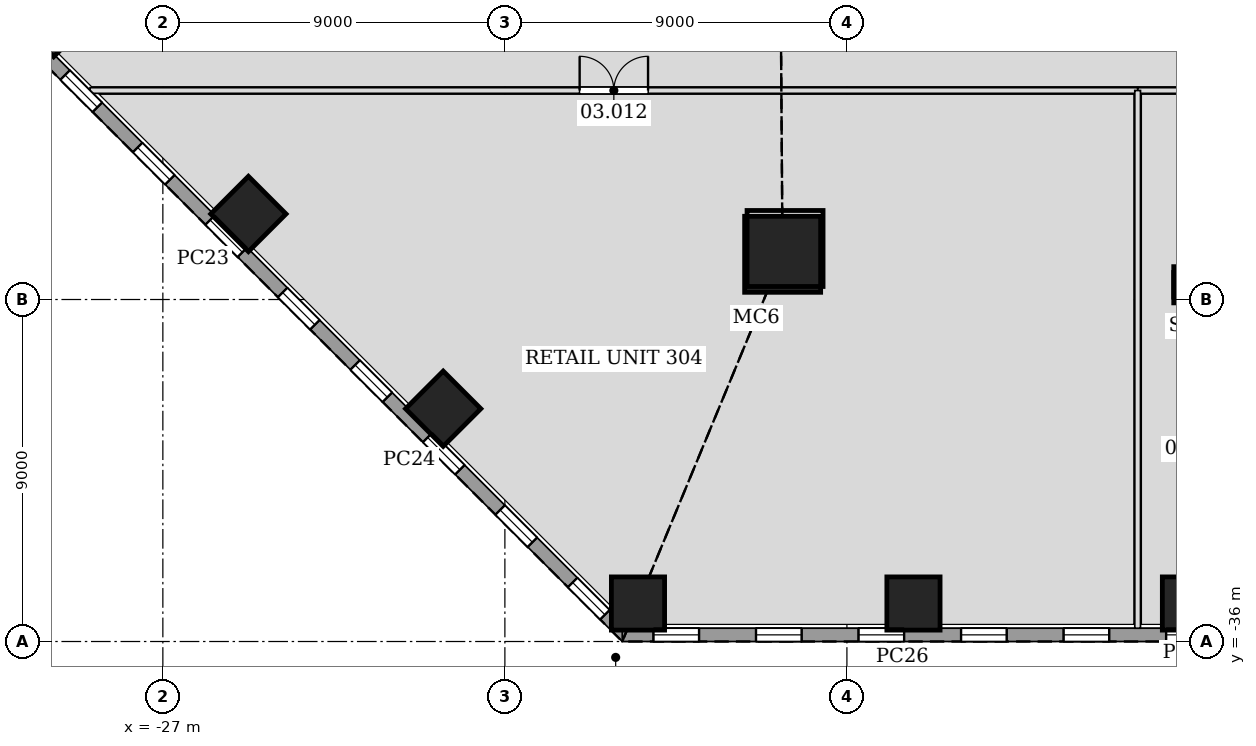
"""IFC4 building model, lengths in metres.
Left out: names, types, materials, properties, quantities, classifications, styles, units other than length and angle.
Written with IfcOpenShell. Run it as: python <this file> out.ifc"""

import sys

from ifc_helpers import new_model, si_unit, direction, frame, frame_2d, origin, origin_2d, place, context, subcontext, project, spatial, rectangle, hollow_rectangle, extrude, element, fill, save


model = new_model("IFC4")
c1 = context("Model", 3, precision=1e-05, world=origin(), true_north=direction((0.0, 1.0)))
c2 = subcontext(c1, "Body", "Model", "MODEL_VIEW")
j1 = project(units=[si_unit("LENGTHUNIT", "METRE"), si_unit("PLANEANGLEUNIT", "RADIAN")], contexts=[c1])
p1 = place(None, origin())
s1 = spatial("IfcSite", under=j1, at=p1, CompositionType="ELEMENT")
p2 = place(p1, origin())
s2 = spatial("IfcBuilding", under=s1, at=p2, CompositionType="ELEMENT")
p3 = place(p2, frame((0.0, 0.0, 18.6)))
s3 = spatial("IfcBuildingStorey", under=s2, at=p3, CompositionType="ELEMENT", Elevation=18.6)
p4 = place(p3, frame((-10.691, -25.81, 0.0), z_axis=(0.011704430453, 0.028289472832, 0.999531246152), x_axis=(-0.92403481427, 0.3823083337, 0.0)))
e1 = element("IfcColumn", 1, at=p4, inside=s3, PredefinedType="COLUMN", context=c2, shape_type="SweptSolid", body=[
    extrude(hollow_rectangle(XDim=2.0, YDim=2.0, WallThickness=0.09, at=origin_2d()), origin(), (0.0, 0.0, 1.0), 5.402),
])
p5 = place(p3, frame((0.0, -26.688, 0.0), z_axis=(0.0, 0.02824625291, 0.999600994996), x_axis=(-1.0, 0.0, 0.0)))
e2 = element("IfcColumn", 2, at=p5, inside=s3, PredefinedType="COLUMN", context=c2, shape_type="SweptSolid", body=[
    extrude(hollow_rectangle(XDim=0.8, YDim=0.8, WallThickness=0.05, at=origin_2d()), origin(), (0.0, 0.0, 1.0), 5.402),
])
for number, where, z_axis, x_axis in (
    (3, (-29.874, -19.623, 0.0), (0.0, 0.0, 1.0), (0.707, 0.707, 0.0)),
    (4, (-24.749, -24.749, 0.0), (0.0, 0.0, 1.0), (0.707, 0.707, 0.0)),
    (5, (-19.623, -29.874, 0.0), (0.0, 0.0, 1.0), (0.707, 0.707, 0.0)),
    (6, (-14.498, -35.0, 0.0), (0.0, 0.0, 1.0), (1.0, 0.0, 0.0)),
    (7, (-7.249, -35.0, 0.0), (0.0, 0.0, 1.0), (1.0, 0.0, 0.0)),
    (8, (0.0, -35.0, 0.0), (0.0, 0.0, 1.0), (1.0, 0.0, 0.0)),
):
    element("IfcColumn", number, at=place(p3, frame(where, z_axis=z_axis, x_axis=x_axis)), inside=s3, PredefinedType="COLUMN", context=c2, shape_type="SweptSolid", body=[
        extrude(rectangle(XDim=1.4, YDim=1.4, at=origin_2d()), origin(), (0.0, 0.0, 1.0), 5.4),
    ])
p6 = place(p3, frame((-35.876, -14.788, 0.0), z_axis=(0.0, 0.0, 1.0), x_axis=(0.707106781187, -0.707106781187, 0.0)))
e9 = element("IfcWall", 9, at=p6, inside=s3, PredefinedType="SOLIDWALL", context=c2, shape_type="SweptSolid", body=[
    extrude(rectangle(XDim=29.823, YDim=0.35, at=frame_2d((14.912, 0.0))), origin(), (0.0, 0.0, 1.0), 5.1),
])
p7 = place(p6, frame((0.822, 0.0, 0.9)))
e10 = element("IfcOpeningElement", 10, at=p7, cuts=e9, PredefinedType="OPENING", context=c2, shape_type="SweptSolid", body=[
    extrude(rectangle(XDim=1.2, YDim=3.6, at=frame_2d((0.6, 1.8))), frame((0.0, 0.185, 0.0), z_axis=(0.0, -1.0, 0.0), x_axis=(1.0, 0.0, 0.0)), (0.0, 0.0, 1.0), 0.37),
])
p8 = place(p6, frame((3.52, 0.0, 0.9)))
e11 = element("IfcOpeningElement", 11, at=p8, cuts=e9, PredefinedType="OPENING", context=c2, shape_type="SweptSolid", body=[
    extrude(rectangle(XDim=1.2, YDim=3.6, at=frame_2d((0.6, 1.8))), frame((0.0, 0.185, 0.0), z_axis=(0.0, -1.0, 0.0), x_axis=(1.0, 0.0, 0.0)), (0.0, 0.0, 1.0), 0.37),
])
p9 = place(p6, frame((6.218, 0.0, 0.9)))
e12 = element("IfcOpeningElement", 12, at=p9, cuts=e9, PredefinedType="OPENING", context=c2, shape_type="SweptSolid", body=[
    extrude(rectangle(XDim=1.2, YDim=3.6, at=frame_2d((0.6, 1.8))), frame((0.0, 0.185, 0.0), z_axis=(0.0, -1.0, 0.0), x_axis=(1.0, 0.0, 0.0)), (0.0, 0.0, 1.0), 0.37),
])
p10 = place(p6, frame((8.916, 0.0, 0.9)))
e13 = element("IfcOpeningElement", 13, at=p10, cuts=e9, PredefinedType="OPENING", context=c2, shape_type="SweptSolid", body=[
    extrude(rectangle(XDim=1.2, YDim=3.6, at=frame_2d((0.6, 1.8))), frame((0.0, 0.185, 0.0), z_axis=(0.0, -1.0, 0.0), x_axis=(1.0, 0.0, 0.0)), (0.0, 0.0, 1.0), 0.37),
])
p11 = place(p6, frame((11.614, 0.0, 0.9)))
e14 = element("IfcOpeningElement", 14, at=p11, cuts=e9, PredefinedType="OPENING", context=c2, shape_type="SweptSolid", body=[
    extrude(rectangle(XDim=1.2, YDim=3.6, at=frame_2d((0.6, 1.8))), frame((0.0, 0.185, 0.0), z_axis=(0.0, -1.0, 0.0), x_axis=(1.0, 0.0, 0.0)), (0.0, 0.0, 1.0), 0.37),
])
p12 = place(p6, frame((14.312, 0.0, 0.9)))
e15 = element("IfcOpeningElement", 15, at=p12, cuts=e9, PredefinedType="OPENING", context=c2, shape_type="SweptSolid", body=[
    extrude(rectangle(XDim=1.2, YDim=3.6, at=frame_2d((0.6, 1.8))), frame((0.0, 0.185, 0.0), z_axis=(0.0, -1.0, 0.0), x_axis=(1.0, 0.0, 0.0)), (0.0, 0.0, 1.0), 0.37),
])
p13 = place(p6, frame((17.01, 0.0, 0.9)))
e16 = element("IfcOpeningElement", 16, at=p13, cuts=e9, PredefinedType="OPENING", context=c2, shape_type="SweptSolid", body=[
    extrude(rectangle(XDim=1.2, YDim=3.6, at=frame_2d((0.6, 1.8))), frame((0.0, 0.185, 0.0), z_axis=(0.0, -1.0, 0.0), x_axis=(1.0, 0.0, 0.0)), (0.0, 0.0, 1.0), 0.37),
])
p14 = place(p6, frame((19.708, 0.0, 0.9)))
e17 = element("IfcOpeningElement", 17, at=p14, cuts=e9, PredefinedType="OPENING", context=c2, shape_type="SweptSolid", body=[
    extrude(rectangle(XDim=1.2, YDim=3.6, at=frame_2d((0.6, 1.8))), frame((0.0, 0.185, 0.0), z_axis=(0.0, -1.0, 0.0), x_axis=(1.0, 0.0, 0.0)), (0.0, 0.0, 1.0), 0.37),
])
p15 = place(p6, frame((22.406, 0.0, 0.9)))
e18 = element("IfcOpeningElement", 18, at=p15, cuts=e9, PredefinedType="OPENING", context=c2, shape_type="SweptSolid", body=[
    extrude(rectangle(XDim=1.2, YDim=3.6, at=frame_2d((0.6, 1.8))), frame((0.0, 0.185, 0.0), z_axis=(0.0, -1.0, 0.0), x_axis=(1.0, 0.0, 0.0)), (0.0, 0.0, 1.0), 0.37),
])
p16 = place(p6, frame((25.104, 0.0, 0.9)))
e19 = element("IfcOpeningElement", 19, at=p16, cuts=e9, PredefinedType="OPENING", context=c2, shape_type="SweptSolid", body=[
    extrude(rectangle(XDim=1.2, YDim=3.6, at=frame_2d((0.6, 1.8))), frame((0.0, 0.185, 0.0), z_axis=(0.0, -1.0, 0.0), x_axis=(1.0, 0.0, 0.0)), (0.0, 0.0, 1.0), 0.37),
])
p17 = place(p6, frame((27.802, 0.0, 0.9)))
e20 = element("IfcOpeningElement", 20, at=p17, cuts=e9, PredefinedType="OPENING", context=c2, shape_type="SweptSolid", body=[
    extrude(rectangle(XDim=1.2, YDim=3.6, at=frame_2d((0.6, 1.8))), frame((0.0, 0.185, 0.0), z_axis=(0.0, -1.0, 0.0), x_axis=(1.0, 0.0, 0.0)), (0.0, 0.0, 1.0), 0.37),
])
p18 = place(p3, frame((-14.912, -35.825, 0.0), z_axis=(0.0, 0.0, 1.0), x_axis=(1.0, 0.0, 0.0)))
e21 = element("IfcWall", 21, at=p18, inside=s3, PredefinedType="SOLIDWALL", context=c2, shape_type="SweptSolid", body=[
    extrude(rectangle(XDim=29.823, YDim=0.35, at=frame_2d((14.912, 0.0))), origin(), (0.0, 0.0, 1.0), 5.1),
])
p19 = place(p18, frame((0.822, 0.0, 0.9)))
e22 = element("IfcOpeningElement", 22, at=p19, cuts=e21, PredefinedType="OPENING", context=c2, shape_type="SweptSolid", body=[
    extrude(rectangle(XDim=1.2, YDim=3.6, at=frame_2d((0.6, 1.8))), frame((0.0, 0.185, 0.0), z_axis=(0.0, -1.0, 0.0), x_axis=(1.0, 0.0, 0.0)), (0.0, 0.0, 1.0), 0.37),
])
p20 = place(p18, frame((3.52, 0.0, 0.9)))
e23 = element("IfcOpeningElement", 23, at=p20, cuts=e21, PredefinedType="OPENING", context=c2, shape_type="SweptSolid", body=[
    extrude(rectangle(XDim=1.2, YDim=3.6, at=frame_2d((0.6, 1.8))), frame((0.0, 0.185, 0.0), z_axis=(0.0, -1.0, 0.0), x_axis=(1.0, 0.0, 0.0)), (0.0, 0.0, 1.0), 0.37),
])
p21 = place(p18, frame((6.218, 0.0, 0.9)))
e24 = element("IfcOpeningElement", 24, at=p21, cuts=e21, PredefinedType="OPENING", context=c2, shape_type="SweptSolid", body=[
    extrude(rectangle(XDim=1.2, YDim=3.6, at=frame_2d((0.6, 1.8))), frame((0.0, 0.185, 0.0), z_axis=(0.0, -1.0, 0.0), x_axis=(1.0, 0.0, 0.0)), (0.0, 0.0, 1.0), 0.37),
])
p22 = place(p18, frame((8.916, 0.0, 0.9)))
e25 = element("IfcOpeningElement", 25, at=p22, cuts=e21, PredefinedType="OPENING", context=c2, shape_type="SweptSolid", body=[
    extrude(rectangle(XDim=1.2, YDim=3.6, at=frame_2d((0.6, 1.8))), frame((0.0, 0.185, 0.0), z_axis=(0.0, -1.0, 0.0), x_axis=(1.0, 0.0, 0.0)), (0.0, 0.0, 1.0), 0.37),
])
p23 = place(p18, frame((11.614, 0.0, 0.9)))
e26 = element("IfcOpeningElement", 26, at=p23, cuts=e21, PredefinedType="OPENING", context=c2, shape_type="SweptSolid", body=[
    extrude(rectangle(XDim=1.2, YDim=3.6, at=frame_2d((0.6, 1.8))), frame((0.0, 0.185, 0.0), z_axis=(0.0, -1.0, 0.0), x_axis=(1.0, 0.0, 0.0)), (0.0, 0.0, 1.0), 0.37),
])
p24 = place(p18, frame((14.312, 0.0, 0.9)))
e27 = element("IfcOpeningElement", 27, at=p24, cuts=e21, PredefinedType="OPENING", context=c2, shape_type="SweptSolid", body=[
    extrude(rectangle(XDim=1.2, YDim=3.6, at=frame_2d((0.6, 1.8))), frame((0.0, 0.185, 0.0), z_axis=(0.0, -1.0, 0.0), x_axis=(1.0, 0.0, 0.0)), (0.0, 0.0, 1.0), 0.37),
])
p25 = place(p18, frame((17.01, 0.0, 0.9)))
e28 = element("IfcOpeningElement", 28, at=p25, cuts=e21, PredefinedType="OPENING", context=c2, shape_type="SweptSolid", body=[
    extrude(rectangle(XDim=1.2, YDim=3.6, at=frame_2d((0.6, 1.8))), frame((0.0, 0.185, 0.0), z_axis=(0.0, -1.0, 0.0), x_axis=(1.0, 0.0, 0.0)), (0.0, 0.0, 1.0), 0.37),
])
p26 = place(p18, frame((19.708, 0.0, 0.9)))
e29 = element("IfcOpeningElement", 29, at=p26, cuts=e21, PredefinedType="OPENING", context=c2, shape_type="SweptSolid", body=[
    extrude(rectangle(XDim=1.2, YDim=3.6, at=frame_2d((0.6, 1.8))), frame((0.0, 0.185, 0.0), z_axis=(0.0, -1.0, 0.0), x_axis=(1.0, 0.0, 0.0)), (0.0, 0.0, 1.0), 0.37),
])
p27 = place(p18, frame((22.406, 0.0, 0.9)))
e30 = element("IfcOpeningElement", 30, at=p27, cuts=e21, PredefinedType="OPENING", context=c2, shape_type="SweptSolid", body=[
    extrude(rectangle(XDim=1.2, YDim=3.6, at=frame_2d((0.6, 1.8))), frame((0.0, 0.185, 0.0), z_axis=(0.0, -1.0, 0.0), x_axis=(1.0, 0.0, 0.0)), (0.0, 0.0, 1.0), 0.37),
])
p28 = place(p18, frame((25.104, 0.0, 0.9)))
e31 = element("IfcOpeningElement", 31, at=p28, cuts=e21, PredefinedType="OPENING", context=c2, shape_type="SweptSolid", body=[
    extrude(rectangle(XDim=1.2, YDim=3.6, at=frame_2d((0.6, 1.8))), frame((0.0, 0.185, 0.0), z_axis=(0.0, -1.0, 0.0), x_axis=(1.0, 0.0, 0.0)), (0.0, 0.0, 1.0), 0.37),
])
p29 = place(p18, frame((27.802, 0.0, 0.9)))
e32 = element("IfcOpeningElement", 32, at=p29, cuts=e21, PredefinedType="OPENING", context=c2, shape_type="SweptSolid", body=[
    extrude(rectangle(XDim=1.2, YDim=3.6, at=frame_2d((0.6, 1.8))), frame((0.0, 0.185, 0.0), z_axis=(0.0, -1.0, 0.0), x_axis=(1.0, 0.0, 0.0)), (0.0, 0.0, 1.0), 0.37),
])
p30 = place(p3, frame((-1.351, -21.5, 0.0), z_axis=(0.0, 0.0, 1.0), x_axis=(1.0, 0.0, 0.0)))
e33 = element("IfcWall", 33, at=p30, inside=s3, PredefinedType="PARTITIONING", context=c2, shape_type="SweptSolid", body=[
    extrude(rectangle(XDim=30.268, YDim=0.15, at=frame_2d((15.134, 0.0))), origin(), (0.0, 0.0, 1.0), 3.79),
])
p31 = place(p30, frame((14.234, 0.0, 0.0)))
e34 = element("IfcOpeningElement", 34, at=p31, cuts=e33, PredefinedType="OPENING", context=c2, shape_type="SweptSolid", body=[
    extrude(rectangle(XDim=1.8, YDim=2.4, at=frame_2d((0.9, 1.2))), frame((0.0, 0.085, 0.0), z_axis=(0.0, -1.0, 0.0), x_axis=(1.0, 0.0, 0.0)), (0.0, 0.0, 1.0), 0.17),
])
p32 = place(p3, frame((-28.917, -21.5, 0.0), z_axis=(0.0, 0.0, 1.0), x_axis=(1.0, 0.0, 0.0)))
e35 = element("IfcWall", 35, at=p32, inside=s3, PredefinedType="PARTITIONING", context=c2, shape_type="SweptSolid", body=[
    extrude(rectangle(XDim=27.568, YDim=0.15, at=frame_2d((13.784, 0.0))), origin(), (0.0, 0.0, 1.0), 3.79),
])
p33 = place(p32, frame((12.884, 0.0, 0.0)))
e36 = element("IfcOpeningElement", 36, at=p33, cuts=e35, PredefinedType="OPENING", context=c2, shape_type="SweptSolid", body=[
    extrude(rectangle(XDim=1.8, YDim=2.4, at=frame_2d((0.9, 1.2))), frame((0.0, 0.085, 0.0), z_axis=(0.0, -1.0, 0.0), x_axis=(1.0, 0.0, 0.0)), (0.0, 0.0, 1.0), 0.17),
])
p34 = place(p3, frame((-1.35, -21.5, 0.0), z_axis=(0.0, 0.0, 1.0), x_axis=(0.0, -1.0, 0.0)))
e37 = element("IfcWall", 37, at=p34, inside=s3, PredefinedType="PARTITIONING", context=c2, shape_type="SweptSolid", body=[
    extrude(rectangle(XDim=14.15, YDim=0.15, at=frame_2d((7.075, 0.0))), origin(), (0.0, 0.0, 1.0), 4.163),
])
p35 = place(p10, origin())
e38 = element("IfcWindow", 38, at=p35, inside=s3, PartitioningType="SINGLE_PANEL", PredefinedType="WINDOW", context=c2, shape_type="SweptSolid", body=[
    extrude(rectangle(XDim=1.2, YDim=3.6, at=frame_2d((0.6, 1.8))), frame((0.0, 0.03, 0.0), z_axis=(0.0, -1.0, 0.0), x_axis=(1.0, 0.0, 0.0)), (0.0, 0.0, 1.0), 0.06),
])
fill(e13, e38)
p36 = place(p11, origin())
e39 = element("IfcWindow", 39, at=p36, inside=s3, PartitioningType="SINGLE_PANEL", PredefinedType="WINDOW", context=c2, shape_type="SweptSolid", body=[
    extrude(rectangle(XDim=1.2, YDim=3.6, at=frame_2d((0.6, 1.8))), frame((0.0, 0.03, 0.0), z_axis=(0.0, -1.0, 0.0), x_axis=(1.0, 0.0, 0.0)), (0.0, 0.0, 1.0), 0.06),
])
fill(e14, e39)
p37 = place(p12, origin())
e40 = element("IfcWindow", 40, at=p37, inside=s3, PartitioningType="SINGLE_PANEL", PredefinedType="WINDOW", context=c2, shape_type="SweptSolid", body=[
    extrude(rectangle(XDim=1.2, YDim=3.6, at=frame_2d((0.6, 1.8))), frame((0.0, 0.03, 0.0), z_axis=(0.0, -1.0, 0.0), x_axis=(1.0, 0.0, 0.0)), (0.0, 0.0, 1.0), 0.06),
])
fill(e15, e40)
p38 = place(p13, origin())
e41 = element("IfcWindow", 41, at=p38, inside=s3, PartitioningType="SINGLE_PANEL", PredefinedType="WINDOW", context=c2, shape_type="SweptSolid", body=[
    extrude(rectangle(XDim=1.2, YDim=3.6, at=frame_2d((0.6, 1.8))), frame((0.0, 0.03, 0.0), z_axis=(0.0, -1.0, 0.0), x_axis=(1.0, 0.0, 0.0)), (0.0, 0.0, 1.0), 0.06),
])
fill(e16, e41)
p39 = place(p14, origin())
e42 = element("IfcWindow", 42, at=p39, inside=s3, PartitioningType="SINGLE_PANEL", PredefinedType="WINDOW", context=c2, shape_type="SweptSolid", body=[
    extrude(rectangle(XDim=1.2, YDim=3.6, at=frame_2d((0.6, 1.8))), frame((0.0, 0.03, 0.0), z_axis=(0.0, -1.0, 0.0), x_axis=(1.0, 0.0, 0.0)), (0.0, 0.0, 1.0), 0.06),
])
fill(e17, e42)
p40 = place(p15, origin())
e43 = element("IfcWindow", 43, at=p40, inside=s3, PartitioningType="SINGLE_PANEL", PredefinedType="WINDOW", context=c2, shape_type="SweptSolid", body=[
    extrude(rectangle(XDim=1.2, YDim=3.6, at=frame_2d((0.6, 1.8))), frame((0.0, 0.03, 0.0), z_axis=(0.0, -1.0, 0.0), x_axis=(1.0, 0.0, 0.0)), (0.0, 0.0, 1.0), 0.06),
])
fill(e18, e43)
p41 = place(p16, origin())
e44 = element("IfcWindow", 44, at=p41, inside=s3, PartitioningType="SINGLE_PANEL", PredefinedType="WINDOW", context=c2, shape_type="SweptSolid", body=[
    extrude(rectangle(XDim=1.2, YDim=3.6, at=frame_2d((0.6, 1.8))), frame((0.0, 0.03, 0.0), z_axis=(0.0, -1.0, 0.0), x_axis=(1.0, 0.0, 0.0)), (0.0, 0.0, 1.0), 0.06),
])
fill(e19, e44)
p42 = place(p17, origin())
e45 = element("IfcWindow", 45, at=p42, inside=s3, PartitioningType="SINGLE_PANEL", PredefinedType="WINDOW", context=c2, shape_type="SweptSolid", body=[
    extrude(rectangle(XDim=1.2, YDim=3.6, at=frame_2d((0.6, 1.8))), frame((0.0, 0.03, 0.0), z_axis=(0.0, -1.0, 0.0), x_axis=(1.0, 0.0, 0.0)), (0.0, 0.0, 1.0), 0.06),
])
fill(e20, e45)
p43 = place(p19, origin())
e46 = element("IfcWindow", 46, at=p43, inside=s3, PartitioningType="SINGLE_PANEL", PredefinedType="WINDOW", context=c2, shape_type="SweptSolid", body=[
    extrude(rectangle(XDim=1.2, YDim=3.6, at=frame_2d((0.6, 1.8))), frame((0.0, 0.03, 0.0), z_axis=(0.0, -1.0, 0.0), x_axis=(1.0, 0.0, 0.0)), (0.0, 0.0, 1.0), 0.06),
])
fill(e22, e46)
p44 = place(p20, origin())
e47 = element("IfcWindow", 47, at=p44, inside=s3, PartitioningType="SINGLE_PANEL", PredefinedType="WINDOW", context=c2, shape_type="SweptSolid", body=[
    extrude(rectangle(XDim=1.2, YDim=3.6, at=frame_2d((0.6, 1.8))), frame((0.0, 0.03, 0.0), z_axis=(0.0, -1.0, 0.0), x_axis=(1.0, 0.0, 0.0)), (0.0, 0.0, 1.0), 0.06),
])
fill(e23, e47)
p45 = place(p21, origin())
e48 = element("IfcWindow", 48, at=p45, inside=s3, PartitioningType="SINGLE_PANEL", PredefinedType="WINDOW", context=c2, shape_type="SweptSolid", body=[
    extrude(rectangle(XDim=1.2, YDim=3.6, at=frame_2d((0.6, 1.8))), frame((0.0, 0.03, 0.0), z_axis=(0.0, -1.0, 0.0), x_axis=(1.0, 0.0, 0.0)), (0.0, 0.0, 1.0), 0.06),
])
fill(e24, e48)
p46 = place(p22, origin())
e49 = element("IfcWindow", 49, at=p46, inside=s3, PartitioningType="SINGLE_PANEL", PredefinedType="WINDOW", context=c2, shape_type="SweptSolid", body=[
    extrude(rectangle(XDim=1.2, YDim=3.6, at=frame_2d((0.6, 1.8))), frame((0.0, 0.03, 0.0), z_axis=(0.0, -1.0, 0.0), x_axis=(1.0, 0.0, 0.0)), (0.0, 0.0, 1.0), 0.06),
])
fill(e25, e49)
p47 = place(p23, origin())
e50 = element("IfcWindow", 50, at=p47, inside=s3, PartitioningType="SINGLE_PANEL", PredefinedType="WINDOW", context=c2, shape_type="SweptSolid", body=[
    extrude(rectangle(XDim=1.2, YDim=3.6, at=frame_2d((0.6, 1.8))), frame((0.0, 0.03, 0.0), z_axis=(0.0, -1.0, 0.0), x_axis=(1.0, 0.0, 0.0)), (0.0, 0.0, 1.0), 0.06),
])
fill(e26, e50)
p48 = place(p24, origin())
e51 = element("IfcWindow", 51, at=p48, inside=s3, PartitioningType="SINGLE_PANEL", PredefinedType="WINDOW", context=c2, shape_type="SweptSolid", body=[
    extrude(rectangle(XDim=1.2, YDim=3.6, at=frame_2d((0.6, 1.8))), frame((0.0, 0.03, 0.0), z_axis=(0.0, -1.0, 0.0), x_axis=(1.0, 0.0, 0.0)), (0.0, 0.0, 1.0), 0.06),
])
fill(e27, e51)
p49 = place(p33, origin())
e52 = element("IfcDoor", 52, at=p49, inside=s3, OperationType="DOUBLE_DOOR_SINGLE_SWING", PredefinedType="DOOR", context=c2, shape_type="SweptSolid", body=[
    extrude(rectangle(XDim=1.8, YDim=2.4, at=frame_2d((0.9, 1.2))), frame((0.0, 0.025, 0.0), z_axis=(0.0, -1.0, 0.0), x_axis=(1.0, 0.0, 0.0)), (0.0, 0.0, 1.0), 0.05),
])
fill(e36, e52)
save(model, sys.argv[1])
